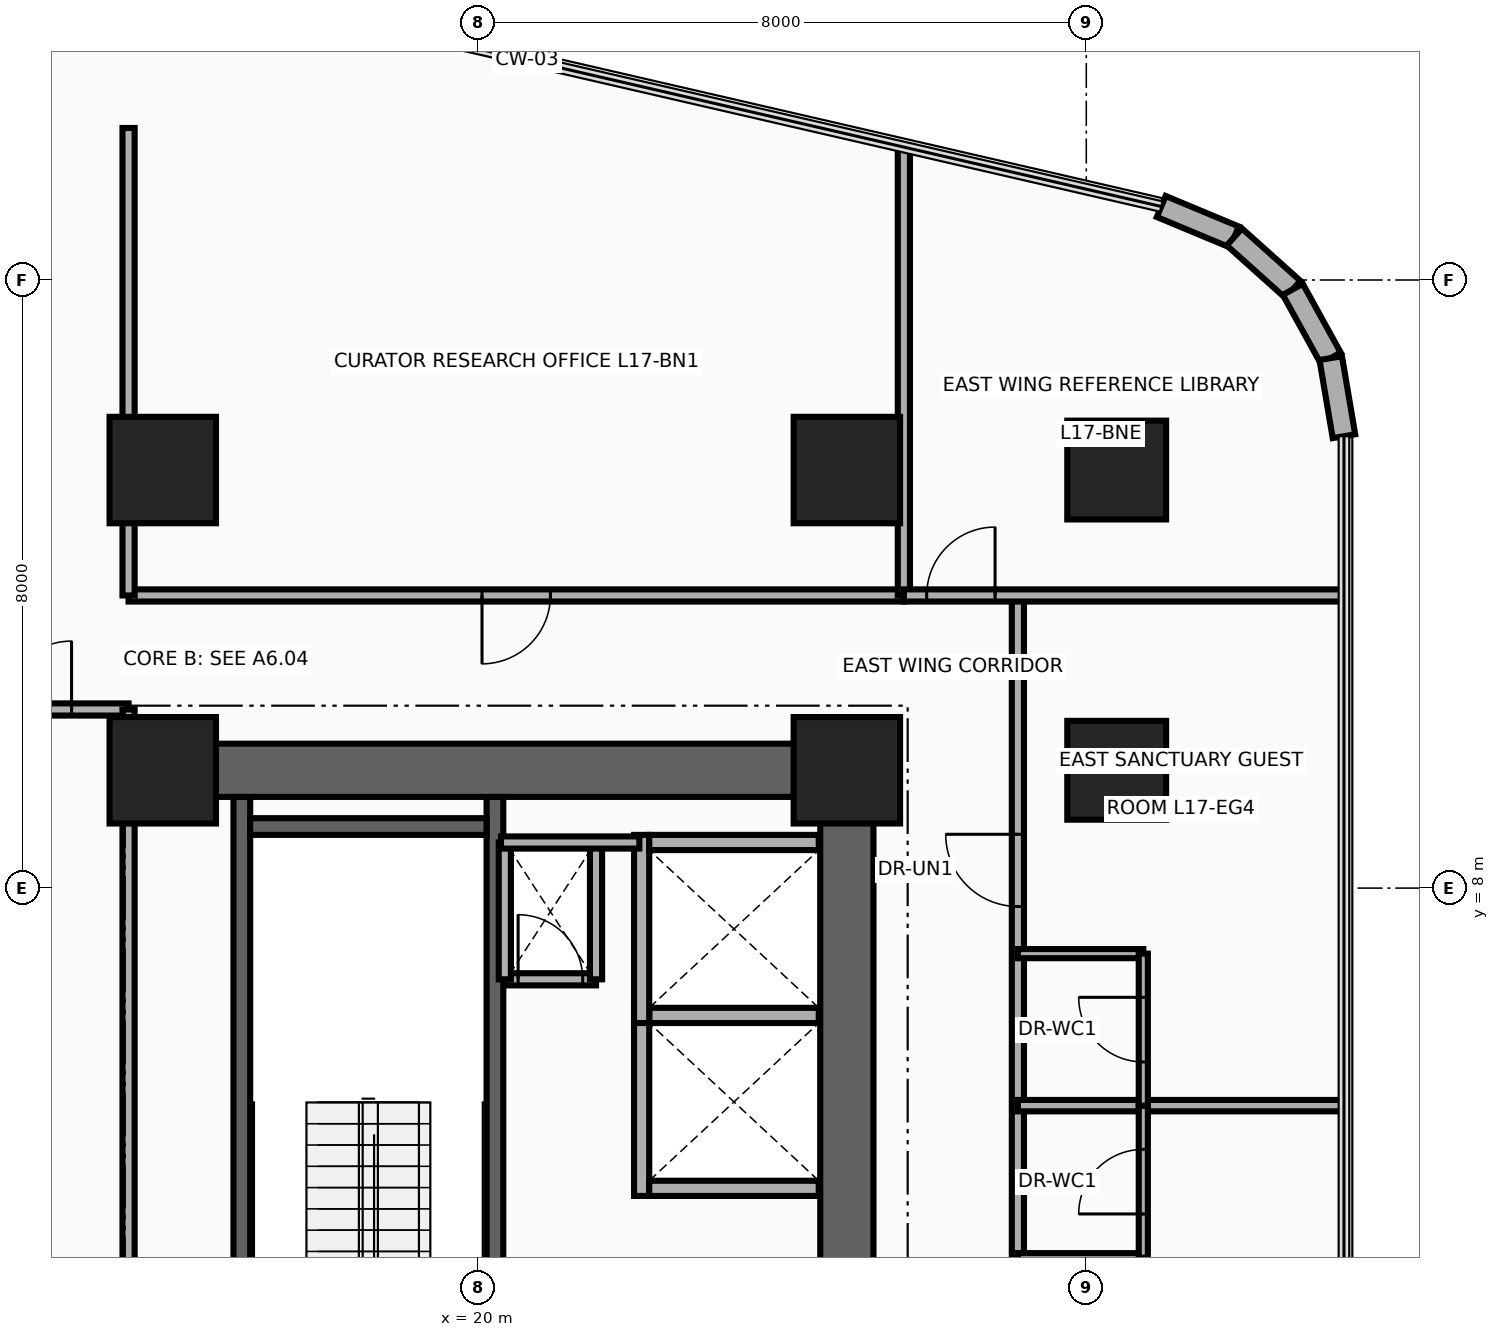
"""IFC4 building model, lengths in metres.
Left out: names, types, materials, properties, quantities, classifications, styles, units other than length and angle.
Written with IfcOpenShell. Run it as: python <this file> out.ifc"""

import sys

from ifc_helpers import new_model, si_unit, direction, frame, frame_2d, origin, origin_2d, place, context, subcontext, project, spatial, rectangle, circle, extrude, source, transform, mapped, element, fill, save


model = new_model("IFC4")
c1 = context("Model", 3, precision=1e-05, world=origin(), true_north=direction((0.0, 1.0)))
c2 = subcontext(c1, "Body", "Model", "MODEL_VIEW")
j1 = project(units=[si_unit("LENGTHUNIT", "METRE"), si_unit("PLANEANGLEUNIT", "RADIAN")], contexts=[c1])
p1 = place(None, origin())
s1 = spatial("IfcSite", under=j1, at=p1, CompositionType="ELEMENT")
p2 = place(p1, origin())
s2 = spatial("IfcBuilding", under=s1, at=p2, CompositionType="ELEMENT")
p3 = place(p2, frame((0.0, 0.0, 70.4)))
s3 = spatial("IfcBuildingStorey", under=s2, at=p3, CompositionType="ELEMENT", Elevation=70.4)
for number, where, z_axis, x_axis in (
    (1, (16.89, 0.68, 0.0), (0.0, 0.0, 1.0), (0.0, 1.0, 0.0)),
    (2, (20.22, 0.68, 0.0), (0.0, 0.0, 1.0), (0.0, 1.0, 0.0)),
):
    element("IfcWall", number, at=place(p3, frame(where, z_axis=z_axis, x_axis=x_axis)), inside=s3, PredefinedType="SHEAR", context=c2, shape_type="SweptSolid", body=[
        extrude(rectangle(XDim=8.52, YDim=0.22, at=frame_2d((4.26, 0.0))), origin(), (0.0, 0.0, 1.0), 3.46),
    ])
p4 = place(p3, frame((17.0, 8.81, 0.0), z_axis=(0.0, 0.0, 1.0), x_axis=(1.0, 0.0, 0.0)))
e3 = element("IfcWall", 3, at=p4, inside=s3, PredefinedType="SHEAR", context=c2, shape_type="SweptSolid", body=[
    extrude(rectangle(XDim=3.11, YDim=0.22, at=frame_2d((1.555, 0.0))), origin(), (0.0, 0.0, 1.0), 3.46),
])
p5 = place(p3, frame((24.85, 0.95, 0.0), z_axis=(0.0, 0.0, 1.0), x_axis=(0.0, 1.0, 0.0)))
e4 = element("IfcWall", 4, at=p5, inside=s3, PredefinedType="SHEAR", context=c2, shape_type="SweptSolid", body=[
    extrude(rectangle(XDim=8.95, YDim=0.7, at=frame_2d((4.475, 0.0))), origin(), (0.0, 0.0, 1.0), 3.46),
])
p6 = place(p3, frame((15.85, 9.55, 0.0), z_axis=(0.0, 0.0, 1.0), x_axis=(1.0, 0.0, 0.0)))
e5 = element("IfcWall", 5, at=p6, inside=s3, PredefinedType="SHEAR", context=c2, shape_type="SweptSolid", body=[
    extrude(rectangle(XDim=9.0, YDim=0.7, at=frame_2d((4.5, 0.0))), origin(), (0.0, 0.0, 1.0), 3.46),
])
m1 = source(origin(), c2, "Body", "SweptSolid", [
    extrude(rectangle(XDim=1.4, YDim=1.4, at=origin_2d()), origin(), (0.0, 0.0, 1.0), 3.7),
])
for number, where, z_axis, x_axis in (
    (6, (15.85, 9.55, 0.0), (0.0, 0.0, 1.0), (1.0, 0.0, 0.0)),
    (7, (24.85, 9.55, 0.0), (0.0, 0.0, 1.0), (1.0, 0.0, 0.0)),
):
    element("IfcColumn", number, at=place(p3, frame(where, z_axis=z_axis, x_axis=x_axis)), inside=s3, PredefinedType="COLUMN", context=c2, shape_type="MappedRepresentation", body=[
        mapped(m1, transform((0.0, 0.0, 0.0), x_axis=(1.0, 0.0, 0.0), y_axis=(0.0, 1.0, 0.0), z_axis=(0.0, 0.0, 1.0), scale=1.0)),
    ])
m2 = source(origin(), c2, "Body", "SweptSolid", [
    extrude(circle(Radius=0.65, at=origin_2d()), origin(), (0.0, 0.0, 1.0), 3.7),
])
p7 = place(p3, frame((28.4, 9.55, 0.0), z_axis=(0.0, 0.0, 1.0), x_axis=(1.0, 0.0, 0.0)))
e8 = element("IfcColumn", 8, at=p7, inside=s3, PredefinedType="COLUMN", context=c2, shape_type="MappedRepresentation", body=[
    mapped(m2, transform((0.0, 0.0, 0.0), x_axis=(1.0, 0.0, 0.0), y_axis=(0.0, 1.0, 0.0), z_axis=(0.0, 0.0, 1.0), scale=1.0)),
])
for number, where, z_axis, x_axis in (
    (9, (15.85, 13.5, 0.0), (0.0, 0.0, 1.0), (1.0, 0.0, 0.0)),
    (10, (24.85, 13.5, 0.0), (0.0, 0.0, 1.0), (1.0, 0.0, 0.0)),
):
    element("IfcColumn", number, at=place(p3, frame(where, z_axis=z_axis, x_axis=x_axis)), inside=s3, PredefinedType="COLUMN", context=c2, shape_type="MappedRepresentation", body=[
        mapped(m1, transform((0.0, 0.0, 0.0), x_axis=(1.0, 0.0, 0.0), y_axis=(0.0, 1.0, 0.0), z_axis=(0.0, 0.0, 1.0), scale=1.0)),
    ])
p8 = place(p3, frame((28.4, 13.5, 0.0), z_axis=(0.0, 0.0, 1.0), x_axis=(1.0, 0.0, 0.0)))
e11 = element("IfcColumn", 11, at=p8, inside=s3, PredefinedType="COLUMN", context=c2, shape_type="MappedRepresentation", body=[
    mapped(m2, transform((0.0, 0.0, 0.0), x_axis=(1.0, 0.0, 0.0), y_axis=(0.0, 1.0, 0.0), z_axis=(0.0, 0.0, 1.0), scale=1.0)),
])
p9 = place(p3, frame((28.986, 16.967, 0.0), z_axis=(0.0, 0.0, 1.0), x_axis=(0.923083852684, -0.384598753136, 0.0)))
e12 = element("IfcWall", 12, at=p9, inside=s3, PredefinedType="SOLIDWALL", context=c2, shape_type="SweptSolid", body=[
    extrude(rectangle(XDim=1.042, YDim=0.3, at=frame_2d((0.521, 0.0))), origin(), (0.0, 0.0, 1.0), 3.46),
])
p10 = place(p3, frame((29.948, 16.566, 0.0), z_axis=(0.0, 0.0, 1.0), x_axis=(0.744585645533, -0.66752694063, 0.0)))
e13 = element("IfcWall", 13, at=p10, inside=s3, PredefinedType="SOLIDWALL", context=c2, shape_type="SweptSolid", body=[
    extrude(rectangle(XDim=1.033, YDim=0.3, at=frame_2d((0.517, 0.0))), origin(), (0.0, 0.0, 1.0), 3.46),
])
p11 = place(p3, frame((30.717, 15.877, 0.0), z_axis=(0.0, 0.0, 1.0), x_axis=(0.482971098131, -0.875636293429, 0.0)))
e14 = element("IfcWall", 14, at=p11, inside=s3, PredefinedType="SOLIDWALL", context=c2, shape_type="SweptSolid", body=[
    extrude(rectangle(XDim=1.033, YDim=0.3, at=frame_2d((0.516, 0.0))), origin(), (0.0, 0.0, 1.0), 3.46),
])
p12 = place(p3, frame((31.216, 14.973, 0.0), z_axis=(0.0, 0.0, 1.0), x_axis=(0.167019462117, -0.985953598946, 0.0)))
e15 = element("IfcWall", 15, at=p12, inside=s3, PredefinedType="SOLIDWALL", context=c2, shape_type="SweptSolid", body=[
    extrude(rectangle(XDim=1.042, YDim=0.3, at=frame_2d((0.521, 0.0))), origin(), (0.0, 0.0, 1.0), 3.46),
])
p13 = place(p3, frame((22.15, 3.95, 0.0), z_axis=(0.0, 0.0, 1.0), x_axis=(0.0, 1.0, 0.0)))
e16 = element("IfcWall", 16, at=p13, inside=s3, PredefinedType="MOVABLE", context=c2, shape_type="SweptSolid", body=[
    extrude(rectangle(XDim=2.475, YDim=0.2, at=frame_2d((1.238, 0.0))), origin(), (0.0, 0.0, 1.0), 3.46),
])
for number, where, z_axis, x_axis in (
    (17, (22.25, 4.05, 0.0), (0.0, 0.0, 1.0), (1.0, 0.0, 0.0)),
    (18, (22.25, 6.325, 0.0), (0.0, 0.0, 1.0), (1.0, 0.0, 0.0)),
):
    element("IfcWall", number, at=place(p3, frame(where, z_axis=z_axis, x_axis=x_axis)), inside=s3, PredefinedType="MOVABLE", context=c2, shape_type="SweptSolid", body=[
        extrude(rectangle(XDim=2.23, YDim=0.2, at=frame_2d((1.115, 0.0))), origin(), (0.0, 0.0, 1.0), 2.245),
    ])
p14 = place(p3, frame((22.15, 6.225, 0.0), z_axis=(0.0, 0.0, 1.0), x_axis=(0.0, 1.0, 0.0)))
e19 = element("IfcWall", 19, at=p14, inside=s3, PredefinedType="MOVABLE", context=c2, shape_type="SweptSolid", body=[
    extrude(rectangle(XDim=2.475, YDim=0.2, at=frame_2d((1.237, 0.0))), origin(), (0.0, 0.0, 1.0), 3.46),
])
p15 = place(p3, frame((22.25, 8.6, 0.0), z_axis=(0.0, 0.0, 1.0), x_axis=(1.0, 0.0, 0.0)))
e20 = element("IfcWall", 20, at=p15, inside=s3, PredefinedType="MOVABLE", context=c2, shape_type="SweptSolid", body=[
    extrude(rectangle(XDim=2.23, YDim=0.2, at=frame_2d((1.115, 0.0))), origin(), (0.0, 0.0, 1.0), 2.245),
])
p16 = place(p3, frame((20.35, 6.8, 0.0), z_axis=(0.0, 0.0, 1.0), x_axis=(1.0, 0.0, 0.0)))
e21 = element("IfcWall", 21, at=p16, inside=s3, PredefinedType="PARTITIONING", context=c2, shape_type="SweptSolid", body=[
    extrude(rectangle(XDim=1.2, YDim=0.16, at=frame_2d((0.6, 0.0))), origin(), (0.0, 0.0, 1.0), 3.46),
])
p17 = place(p16, frame((0.175, 0.0, 0.0)))
e22 = element("IfcOpeningElement", 22, at=p17, cuts=e21, PredefinedType="OPENING", context=c2, shape_type="SweptSolid", body=[
    extrude(rectangle(XDim=0.85, YDim=2.05, at=frame_2d((0.425, 1.025))), frame((0.0, 0.095, 0.0), z_axis=(0.0, -1.0, 0.0), x_axis=(1.0, 0.0, 0.0)), (0.0, 0.0, 1.0), 0.19),
])
for number, where, z_axis, x_axis in (
    (23, (21.55, 6.8, 0.0), (0.0, 0.0, 1.0), (0.0, 1.0, 0.0)),
    (24, (20.35, 6.8, 0.0), (0.0, 0.0, 1.0), (0.0, 1.0, 0.0)),
):
    element("IfcWall", number, at=place(p3, frame(where, z_axis=z_axis, x_axis=x_axis)), inside=s3, PredefinedType="PARTITIONING", context=c2, shape_type="SweptSolid", body=[
        extrude(rectangle(XDim=1.8, YDim=0.16, at=frame_2d((0.9, 0.0))), origin(), (0.0, 0.0, 1.0), 3.46),
    ])
p18 = place(p3, frame((20.3, 8.6, 0.0), z_axis=(0.0, 0.0, 1.0), x_axis=(1.0, 0.0, 0.0)))
e25 = element("IfcWall", 25, at=p18, inside=s3, PredefinedType="PARTITIONING", context=c2, shape_type="SweptSolid", body=[
    extrude(rectangle(XDim=1.82, YDim=0.16, at=frame_2d((0.91, 0.0))), origin(), (0.0, 0.0, 1.0), 3.46),
])
p19 = place(p3, frame((15.4, 11.85, 0.0), z_axis=(0.0, 0.0, 1.0), x_axis=(1.0, 0.0, 0.0)))
e26 = element("IfcWall", 26, at=p19, inside=s3, PredefinedType="PARTITIONING", context=c2, shape_type="SweptSolid", body=[
    extrude(rectangle(XDim=10.2, YDim=0.16, at=frame_2d((5.1, 0.0))), origin(), (0.0, 0.0, 1.0), 2.834),
])
p20 = place(p19, frame((4.65, 0.0, 0.0)))
e27 = element("IfcOpeningElement", 27, at=p20, cuts=e26, PredefinedType="OPENING", context=c2, shape_type="SweptSolid", body=[
    extrude(rectangle(XDim=0.9, YDim=2.1, at=frame_2d((0.45, 1.05))), frame((0.0, 0.095, 0.0), z_axis=(0.0, -1.0, 0.0), x_axis=(1.0, 0.0, 0.0)), (0.0, 0.0, 1.0), 0.19),
])
p21 = place(p3, frame((15.4, 11.85, 0.0), z_axis=(0.0, 0.0, 1.0), x_axis=(0.0, 1.0, 0.0)))
e28 = element("IfcWall", 28, at=p21, inside=s3, PredefinedType="PARTITIONING", context=c2, shape_type="SweptSolid", body=[
    extrude(rectangle(XDim=6.15, YDim=0.16, at=frame_2d((3.075, 0.0))), origin(), (0.0, 0.0, 1.0), 2.583),
])
p22 = place(p3, frame((25.6, 11.85, 0.0), z_axis=(0.0, 0.0, 1.0), x_axis=(0.0, 1.0, 0.0)))
e29 = element("IfcWall", 29, at=p22, inside=s3, PredefinedType="PARTITIONING", context=c2, shape_type="SweptSolid", body=[
    extrude(rectangle(XDim=5.898, YDim=0.16, at=frame_2d((2.949, 0.0))), origin(), (0.0, 0.0, 1.0), 2.583),
])
p23 = place(p3, frame((27.1, -13.89, 0.0), z_axis=(0.0, 0.0, 1.0), x_axis=(0.0, 1.0, 0.0)))
e30 = element("IfcWall", 30, at=p23, inside=s3, PredefinedType="PARTITIONING", context=c2, shape_type="SweptSolid", body=[
    extrude(rectangle(XDim=25.74, YDim=0.16, at=frame_2d((12.87, 0.0))), origin(), (0.0, 0.0, 1.0), 2.583),
])
p24 = place(p23, frame((2.62, 0.0, 0.0)))
e31 = element("IfcOpeningElement", 31, at=p24, cuts=e30, PredefinedType="OPENING", context=c2, shape_type="SweptSolid", body=[
    extrude(rectangle(XDim=0.95, YDim=2.15, at=frame_2d((0.475, 1.075))), frame((0.0, 0.095, 0.0), z_axis=(0.0, -1.0, 0.0), x_axis=(1.0, 0.0, 0.0)), (0.0, 0.0, 1.0), 0.19),
])
p25 = place(p23, frame((8.484, 0.0, 0.0)))
e32 = element("IfcOpeningElement", 32, at=p25, cuts=e30, PredefinedType="OPENING", context=c2, shape_type="SweptSolid", body=[
    extrude(rectangle(XDim=0.95, YDim=2.15, at=frame_2d((0.475, 1.075))), frame((0.0, 0.095, 0.0), z_axis=(0.0, -1.0, 0.0), x_axis=(1.0, 0.0, 0.0)), (0.0, 0.0, 1.0), 0.19),
])
p26 = place(p23, frame((14.197, 0.0, 0.0)))
e33 = element("IfcOpeningElement", 33, at=p26, cuts=e30, PredefinedType="OPENING", context=c2, shape_type="SweptSolid", body=[
    extrude(rectangle(XDim=0.95, YDim=2.15, at=frame_2d((0.475, 1.075))), frame((0.0, 0.095, 0.0), z_axis=(0.0, -1.0, 0.0), x_axis=(1.0, 0.0, 0.0)), (0.0, 0.0, 1.0), 0.19),
])
p27 = place(p23, frame((21.648, 0.0, 0.0)))
e34 = element("IfcOpeningElement", 34, at=p27, cuts=e30, PredefinedType="OPENING", context=c2, shape_type="SweptSolid", body=[
    extrude(rectangle(XDim=0.95, YDim=2.15, at=frame_2d((0.475, 1.075))), frame((0.0, 0.095, 0.0), z_axis=(0.0, -1.0, 0.0), x_axis=(1.0, 0.0, 0.0)), (0.0, 0.0, 1.0), 0.19),
])
p28 = place(p3, frame((25.6, 11.85, 0.0), z_axis=(0.0, 0.0, 1.0), x_axis=(1.0, 0.0, 0.0)))
e35 = element("IfcWall", 35, at=p28, inside=s3, PredefinedType="PARTITIONING", context=c2, shape_type="SweptSolid", body=[
    extrude(rectangle(XDim=5.79, YDim=0.16, at=frame_2d((2.895, 0.0))), origin(), (0.0, 0.0, 1.0), 2.896),
])
p29 = place(p28, frame((0.3, 0.0, 0.0)))
e36 = element("IfcOpeningElement", 36, at=p29, cuts=e35, PredefinedType="OPENING", context=c2, shape_type="SweptSolid", body=[
    extrude(rectangle(XDim=0.9, YDim=2.1, at=frame_2d((0.45, 1.05))), frame((0.0, 0.095, 0.0), z_axis=(0.0, -1.0, 0.0), x_axis=(1.0, 0.0, 0.0)), (0.0, 0.0, 1.0), 0.19),
])
p30 = place(p3, frame((27.1, 5.138, 0.0), z_axis=(0.0, 0.0, 1.0), x_axis=(1.0, 0.0, 0.0)))
e37 = element("IfcWall", 37, at=p30, inside=s3, PredefinedType="PARTITIONING", context=c2, shape_type="SweptSolid", body=[
    extrude(rectangle(XDim=4.29, YDim=0.15, at=frame_2d((2.145, 0.0))), origin(), (0.0, 0.0, 1.0), 2.896),
])
p31 = place(p3, frame((27.1, 3.138, 0.0), z_axis=(0.0, 0.0, 1.0), x_axis=(1.0, 0.0, 0.0)))
e38 = element("IfcWall", 38, at=p31, inside=s3, PredefinedType="PARTITIONING", context=c2, shape_type="SweptSolid", body=[
    extrude(rectangle(XDim=1.65, YDim=0.12, at=frame_2d((0.825, 0.0))), origin(), (0.0, 0.0, 1.0), 2.896),
])
p32 = place(p3, frame((28.75, 3.138, 0.0), z_axis=(0.0, 0.0, 1.0), x_axis=(0.0, 1.0, 0.0)))
e39 = element("IfcWall", 39, at=p32, inside=s3, PredefinedType="PARTITIONING", context=c2, shape_type="SweptSolid", body=[
    extrude(rectangle(XDim=2.0, YDim=0.12, at=frame_2d((1.0, 0.0))), origin(), (0.0, 0.0, 1.0), 3.46),
])
p33 = place(p32, frame((0.575, 0.0, 0.0)))
e40 = element("IfcOpeningElement", 40, at=p33, cuts=e39, PredefinedType="OPENING", context=c2, shape_type="SweptSolid", body=[
    extrude(rectangle(XDim=0.85, YDim=2.1, at=frame_2d((0.425, 1.05))), frame((0.0, 0.075, 0.0), z_axis=(0.0, -1.0, 0.0), x_axis=(1.0, 0.0, 0.0)), (0.0, 0.0, 1.0), 0.15),
])
p34 = place(p3, frame((27.1, 7.138, 0.0), z_axis=(0.0, 0.0, 1.0), x_axis=(1.0, 0.0, 0.0)))
e41 = element("IfcWall", 41, at=p34, inside=s3, PredefinedType="PARTITIONING", context=c2, shape_type="SweptSolid", body=[
    extrude(rectangle(XDim=1.65, YDim=0.12, at=frame_2d((0.825, 0.0))), origin(), (0.0, 0.0, 1.0), 2.896),
])
p35 = place(p3, frame((28.75, 5.138, 0.0), z_axis=(0.0, 0.0, 1.0), x_axis=(0.0, 1.0, 0.0)))
e42 = element("IfcWall", 42, at=p35, inside=s3, PredefinedType="PARTITIONING", context=c2, shape_type="SweptSolid", body=[
    extrude(rectangle(XDim=2.0, YDim=0.12, at=frame_2d((1.0, 0.0))), origin(), (0.0, 0.0, 1.0), 3.46),
])
p36 = place(p35, frame((0.575, 0.0, 0.0)))
e43 = element("IfcOpeningElement", 43, at=p36, cuts=e42, PredefinedType="OPENING", context=c2, shape_type="SweptSolid", body=[
    extrude(rectangle(XDim=0.85, YDim=2.1, at=frame_2d((0.425, 1.05))), frame((0.0, 0.075, 0.0), z_axis=(0.0, -1.0, 0.0), x_axis=(1.0, 0.0, 0.0)), (0.0, 0.0, 1.0), 0.15),
])
p37 = place(p3, frame((13.3, 10.35, 0.0), z_axis=(0.0, 0.0, 1.0), x_axis=(1.0, 0.0, 0.0)))
e44 = element("IfcWall", 44, at=p37, inside=s3, PredefinedType="PARTITIONING", context=c2, shape_type="SweptSolid", body=[
    extrude(rectangle(XDim=2.1, YDim=0.16, at=frame_2d((1.05, 0.0))), origin(), (0.0, 0.0, 1.0), 2.583),
])
p38 = place(p37, frame((0.45, 0.0, 0.0)))
e45 = element("IfcOpeningElement", 45, at=p38, cuts=e44, PredefinedType="OPENING", context=c2, shape_type="SweptSolid", body=[
    extrude(rectangle(XDim=0.9, YDim=2.1, at=frame_2d((0.45, 1.05))), frame((0.0, 0.095, 0.0), z_axis=(0.0, -1.0, 0.0), x_axis=(1.0, 0.0, 0.0)), (0.0, 0.0, 1.0), 0.19),
])
p39 = place(p3, frame((15.4, 1.0, 0.0), z_axis=(0.0, 0.0, 1.0), x_axis=(0.0, 1.0, 0.0)))
e46 = element("IfcWall", 46, at=p39, inside=s3, PredefinedType="PARTITIONING", context=c2, shape_type="SweptSolid", body=[
    extrude(rectangle(XDim=9.35, YDim=0.16, at=frame_2d((4.675, 0.0))), origin(), (0.0, 0.0, 1.0), 2.245),
])
p40 = place(p17, origin())
e47 = element("IfcDoor", 47, at=p40, inside=s3, OperationType="SINGLE_SWING_LEFT", PredefinedType="DOOR", context=c2, shape_type="SweptSolid", body=[
    extrude(rectangle(XDim=0.85, YDim=2.05, at=frame_2d((0.425, 1.025))), frame((0.0, 0.025, 0.0), z_axis=(0.0, -1.0, 0.0), x_axis=(1.0, 0.0, 0.0)), (0.0, 0.0, 1.0), 0.05),
])
fill(e22, e47)
p41 = place(p20, frame((0.9, 0.0, 0.0), z_axis=(0.0, 0.0, 1.0), x_axis=(-1.0, 0.0, 0.0)))
e48 = element("IfcDoor", 48, at=p41, inside=s3, OperationType="SINGLE_SWING_LEFT", PredefinedType="DOOR", context=c2, shape_type="SweptSolid", body=[
    extrude(rectangle(XDim=0.9, YDim=2.1, at=frame_2d((0.45, 1.05))), frame((0.0, 0.025, 0.0), z_axis=(0.0, -1.0, 0.0), x_axis=(1.0, 0.0, 0.0)), (0.0, 0.0, 1.0), 0.05),
])
fill(e27, e48)
p42 = place(p29, origin())
e49 = element("IfcDoor", 49, at=p42, inside=s3, OperationType="SINGLE_SWING_LEFT", PredefinedType="DOOR", context=c2, shape_type="SweptSolid", body=[
    extrude(rectangle(XDim=0.9, YDim=2.1, at=frame_2d((0.45, 1.05))), frame((0.0, 0.025, 0.0), z_axis=(0.0, -1.0, 0.0), x_axis=(1.0, 0.0, 0.0)), (0.0, 0.0, 1.0), 0.05),
])
fill(e36, e49)
p43 = place(p33, origin())
e50 = element("IfcDoor", 50, at=p43, inside=s3, OperationType="SINGLE_SWING_LEFT", PredefinedType="DOOR", context=c2, shape_type="SweptSolid", body=[
    extrude(rectangle(XDim=0.85, YDim=2.1, at=frame_2d((0.425, 1.05))), frame((0.0, 0.025, 0.0), z_axis=(0.0, -1.0, 0.0), x_axis=(1.0, 0.0, 0.0)), (0.0, 0.0, 1.0), 0.05),
])
fill(e40, e50)
p44 = place(p27, origin())
e51 = element("IfcDoor", 51, at=p44, inside=s3, OperationType="SINGLE_SWING_RIGHT", PredefinedType="DOOR", context=c2, shape_type="SweptSolid", body=[
    extrude(rectangle(XDim=0.95, YDim=2.15, at=frame_2d((0.475, 1.075))), frame((0.0, 0.025, 0.0), z_axis=(0.0, -1.0, 0.0), x_axis=(1.0, 0.0, 0.0)), (0.0, 0.0, 1.0), 0.05),
])
fill(e34, e51)
p45 = place(p36, origin())
e52 = element("IfcDoor", 52, at=p45, inside=s3, OperationType="SINGLE_SWING_LEFT", PredefinedType="DOOR", context=c2, shape_type="SweptSolid", body=[
    extrude(rectangle(XDim=0.85, YDim=2.1, at=frame_2d((0.425, 1.05))), frame((0.0, 0.025, 0.0), z_axis=(0.0, -1.0, 0.0), x_axis=(1.0, 0.0, 0.0)), (0.0, 0.0, 1.0), 0.05),
])
fill(e43, e52)
p46 = place(p38, origin())
e53 = element("IfcDoor", 53, at=p46, inside=s3, OperationType="SINGLE_SWING_RIGHT", PredefinedType="DOOR", context=c2, shape_type="SweptSolid", body=[
    extrude(rectangle(XDim=0.9, YDim=2.1, at=frame_2d((0.45, 1.05))), frame((0.0, 0.025, 0.0), z_axis=(0.0, -1.0, 0.0), x_axis=(1.0, 0.0, 0.0)), (0.0, 0.0, 1.0), 0.05),
])
fill(e45, e53)
save(model, sys.argv[1])
